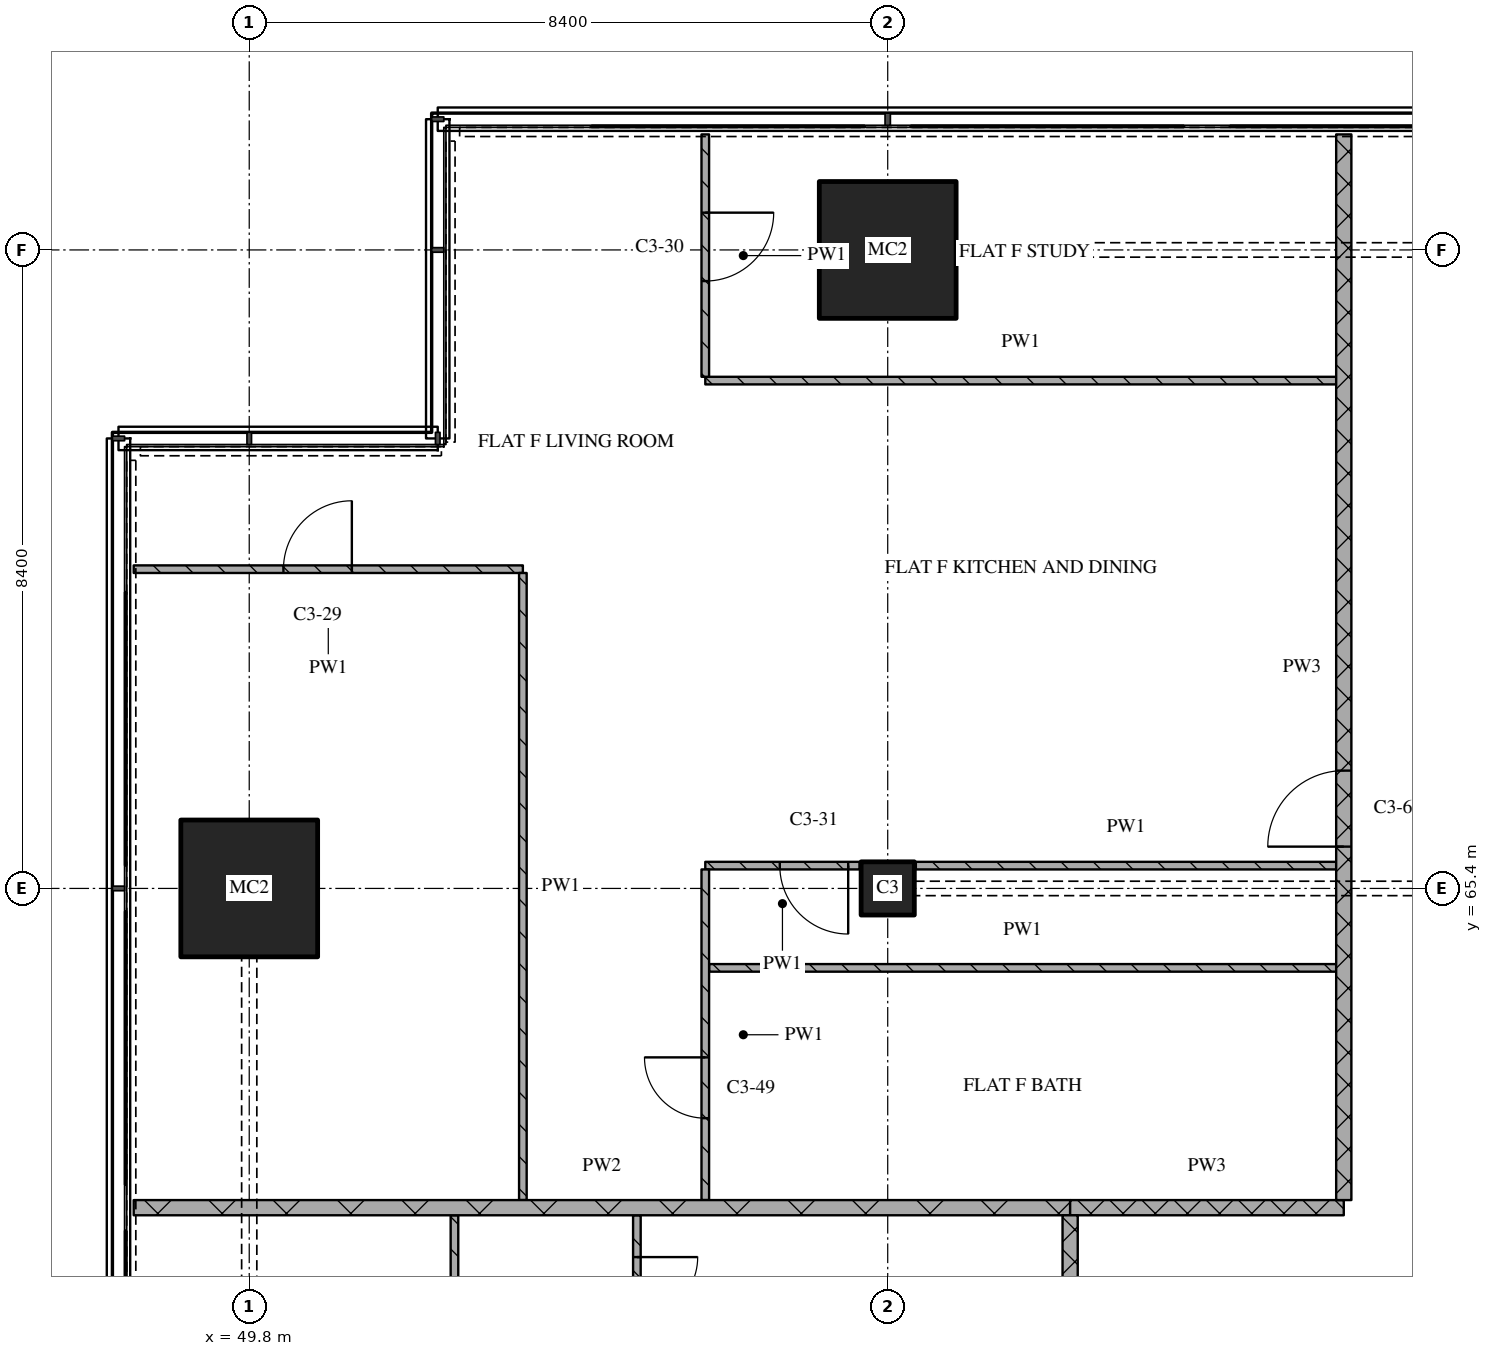
"""IFC4 building model, lengths in metres.
Left out: names, types, materials, properties, quantities, classifications, styles, units other than length and angle.
Written with IfcOpenShell. Run it as: python <this file> out.ifc"""

import sys

from ifc_helpers import new_model, si_unit, direction, frame, frame_2d, origin, origin_2d, place, context, subcontext, project, spatial, rectangle, extrude, element, fill, save


model = new_model("IFC4")
c1 = context("Model", 3, precision=1e-05, world=origin(), true_north=direction((0.0, 1.0)))
c2 = subcontext(c1, "Body", "Model", "MODEL_VIEW")
j1 = project(units=[si_unit("LENGTHUNIT", "METRE"), si_unit("PLANEANGLEUNIT", "RADIAN")], contexts=[c1])
p1 = place(None, origin())
s1 = spatial("IfcSite", under=j1, at=p1, CompositionType="ELEMENT")
p2 = place(p1, origin())
s2 = spatial("IfcBuilding", under=s1, at=p2, CompositionType="ELEMENT")
p3 = place(p2, frame((0.0, 0.0, 169.05)))
s3 = spatial("IfcBuildingStorey", under=s2, at=p3, CompositionType="ELEMENT", Elevation=169.05)
p4 = place(p3, frame((49.8, 65.4, 0.0), z_axis=(0.0, 0.0, 1.0), x_axis=(1.0, 0.0, 0.0)))
e1 = element("IfcColumn", 1, at=p4, inside=s3, PredefinedType="COLUMN", context=c2, shape_type="SweptSolid", body=[
    extrude(rectangle(XDim=1.8, YDim=1.8, at=origin_2d()), origin(), (0.0, 0.0, 1.0), 3.6),
])
p5 = place(p3, frame((58.2, 65.4, 0.0), z_axis=(0.0, 0.0, 1.0), x_axis=(1.0, 0.0, 0.0)))
e2 = element("IfcColumn", 2, at=p5, inside=s3, PredefinedType="COLUMN", context=c2, shape_type="SweptSolid", body=[
    extrude(rectangle(XDim=0.7, YDim=0.7, at=origin_2d()), origin(), (0.0, 0.0, 1.0), 3.6),
])
p6 = place(p3, frame((58.2, 73.8, 0.0), z_axis=(0.0, 0.0, 1.0), x_axis=(1.0, 0.0, 0.0)))
e3 = element("IfcColumn", 3, at=p6, inside=s3, PredefinedType="COLUMN", context=c2, shape_type="SweptSolid", body=[
    extrude(rectangle(XDim=1.8, YDim=1.8, at=origin_2d()), origin(), (0.0, 0.0, 1.0), 3.6),
])
p7 = place(p3, frame((60.6, 61.2, 0.0), z_axis=(0.0, 0.0, 1.0), x_axis=(1.0, 0.0, 0.0)))
e4 = element("IfcWall", 4, at=p7, inside=s3, PredefinedType="PARTITIONING", context=c2, shape_type="SweptSolid", body=[
    extrude(rectangle(XDim=3.6, YDim=0.2, at=frame_2d((1.8, 0.0))), origin(), (0.0, 0.0, 1.0), 3.32),
])
p8 = place(p3, frame((48.28, 61.2, 0.0), z_axis=(0.0, 0.0, 1.0), x_axis=(1.0, 0.0, 0.0)))
e5 = element("IfcWall", 5, at=p8, inside=s3, PredefinedType="PARTITIONING", context=c2, shape_type="SweptSolid", body=[
    extrude(rectangle(XDim=12.32, YDim=0.2, at=frame_2d((6.16, 0.0))), origin(), (0.0, 0.0, 1.0), 3.32),
])
p9 = place(p3, frame((55.85, 64.355, 0.0), z_axis=(0.0, 0.0, 1.0), x_axis=(1.0, 0.0, 0.0)))
e6 = element("IfcWall", 6, at=p9, inside=s3, PredefinedType="PARTITIONING", context=c2, shape_type="SweptSolid", body=[
    extrude(rectangle(XDim=8.25, YDim=0.1, at=frame_2d((4.125, 0.0))), origin(), (0.0, 0.0, 1.0), 3.32),
])
p10 = place(p3, frame((57.83, 65.7, 0.0), z_axis=(0.0, 0.0, 1.0), x_axis=(-1.0, 0.0, 0.0)))
e7 = element("IfcWall", 7, at=p10, inside=s3, PredefinedType="PARTITIONING", context=c2, shape_type="SweptSolid", body=[
    extrude(rectangle(XDim=2.03, YDim=0.1, at=frame_2d((1.015, 0.0))), origin(), (0.0, 0.0, 1.0), 3.32),
])
p11 = place(p10, frame((0.15, 0.0, 0.0)))
e8 = element("IfcOpeningElement", 8, at=p11, cuts=e7, PredefinedType="OPENING", context=c2, shape_type="SweptSolid", body=[
    extrude(rectangle(XDim=0.9, YDim=2.1, at=frame_2d((0.45, 1.05))), frame((0.0, 0.06, 0.0), z_axis=(0.0, -1.0, 0.0), x_axis=(1.0, 0.0, 0.0)), (0.0, 0.0, 1.0), 0.12),
])
p12 = place(p3, frame((58.57, 65.7, 0.0), z_axis=(0.0, 0.0, 1.0), x_axis=(1.0, 0.0, 0.0)))
e9 = element("IfcWall", 9, at=p12, inside=s3, PredefinedType="PARTITIONING", context=c2, shape_type="SweptSolid", body=[
    extrude(rectangle(XDim=5.53, YDim=0.1, at=frame_2d((2.765, 0.0))), origin(), (0.0, 0.0, 1.0), 3.32),
])
p13 = place(p3, frame((53.4, 69.6, 0.0), z_axis=(0.0, 0.0, 1.0), x_axis=(-1.0, 0.0, 0.0)))
e10 = element("IfcWall", 10, at=p13, inside=s3, PredefinedType="PARTITIONING", context=c2, shape_type="SweptSolid", body=[
    extrude(rectangle(XDim=5.12, YDim=0.1, at=frame_2d((2.56, 0.0))), origin(), (0.0, 0.0, 1.0), 3.32),
])
p14 = place(p13, frame((2.25, 0.0, 0.0)))
e11 = element("IfcOpeningElement", 11, at=p14, cuts=e10, PredefinedType="OPENING", context=c2, shape_type="SweptSolid", body=[
    extrude(rectangle(XDim=0.9, YDim=2.1, at=frame_2d((0.45, 1.05))), frame((0.0, 0.06, 0.0), z_axis=(0.0, -1.0, 0.0), x_axis=(1.0, 0.0, 0.0)), (0.0, 0.0, 1.0), 0.12),
])
p15 = place(p3, frame((55.8, 72.081, 0.0), z_axis=(0.0, 0.0, 1.0), x_axis=(1.0, 0.0, 0.0)))
e12 = element("IfcWall", 12, at=p15, inside=s3, PredefinedType="PARTITIONING", context=c2, shape_type="SweptSolid", body=[
    extrude(rectangle(XDim=8.3, YDim=0.1, at=frame_2d((4.15, 0.0))), origin(), (0.0, 0.0, 1.0), 3.32),
])
for number, where, z_axis, x_axis in (
    (13, (52.5, 61.1, 0.0), (0.0, 0.0, 1.0), (0.0, -1.0, 0.0)),
    (14, (53.4, 69.55, 0.0), (0.0, 0.0, 1.0), (0.0, -1.0, 0.0)),
):
    element("IfcWall", number, at=place(p3, frame(where, z_axis=z_axis, x_axis=x_axis)), inside=s3, PredefinedType="PARTITIONING", context=c2, shape_type="SweptSolid", body=[
        extrude(rectangle(XDim=8.25, YDim=0.1, at=frame_2d((4.125, 0.0))), origin(), (0.0, 0.0, 1.0), 3.32),
    ])
p16 = place(p3, frame((54.9, 61.1, 0.0), z_axis=(0.0, 0.0, 1.0), x_axis=(0.0, -1.0, 0.0)))
e15 = element("IfcWall", 15, at=p16, inside=s3, PredefinedType="PARTITIONING", context=c2, shape_type="SweptSolid", body=[
    extrude(rectangle(XDim=4.65, YDim=0.1, at=frame_2d((2.325, 0.0))), origin(), (0.0, 0.0, 1.0), 3.32),
])
p17 = place(p16, frame((0.55, 0.0, 0.0)))
e16 = element("IfcOpeningElement", 16, at=p17, cuts=e15, PredefinedType="OPENING", context=c2, shape_type="SweptSolid", body=[
    extrude(rectangle(XDim=0.8, YDim=2.1, at=frame_2d((0.4, 1.05))), frame((0.0, 0.06, 0.0), z_axis=(0.0, -1.0, 0.0), x_axis=(1.0, 0.0, 0.0)), (0.0, 0.0, 1.0), 0.12),
])
p18 = place(p3, frame((55.8, 65.65, 0.0), z_axis=(0.0, 0.0, 1.0), x_axis=(0.0, -1.0, 0.0)))
e17 = element("IfcWall", 17, at=p18, inside=s3, PredefinedType="PARTITIONING", context=c2, shape_type="SweptSolid", body=[
    extrude(rectangle(XDim=4.35, YDim=0.1, at=frame_2d((2.175, 0.0))), origin(), (0.0, 0.0, 1.0), 3.32),
])
p19 = place(p18, frame((2.473, 0.0, 0.0)))
e18 = element("IfcOpeningElement", 18, at=p19, cuts=e17, PredefinedType="OPENING", context=c2, shape_type="SweptSolid", body=[
    extrude(rectangle(XDim=0.8, YDim=2.1, at=frame_2d((0.4, 1.05))), frame((0.0, 0.06, 0.0), z_axis=(0.0, -1.0, 0.0), x_axis=(1.0, 0.0, 0.0)), (0.0, 0.0, 1.0), 0.12),
])
p20 = place(p3, frame((55.8, 75.32, 0.0), z_axis=(0.0, 0.0, 1.0), x_axis=(0.0, -1.0, 0.0)))
e19 = element("IfcWall", 19, at=p20, inside=s3, PredefinedType="PARTITIONING", context=c2, shape_type="SweptSolid", body=[
    extrude(rectangle(XDim=3.189, YDim=0.1, at=frame_2d((1.594, 0.0))), origin(), (0.0, 0.0, 1.0), 3.32),
])
p21 = place(p20, frame((1.03, 0.0, 0.0)))
e20 = element("IfcOpeningElement", 20, at=p21, cuts=e19, PredefinedType="OPENING", context=c2, shape_type="SweptSolid", body=[
    extrude(rectangle(XDim=0.9, YDim=2.1, at=frame_2d((0.45, 1.05))), frame((0.0, 0.06, 0.0), z_axis=(0.0, -1.0, 0.0), x_axis=(1.0, 0.0, 0.0)), (0.0, 0.0, 1.0), 0.12),
])
p22 = place(p3, frame((60.6, 43.3, 0.0), z_axis=(0.0, 0.0, 1.0), x_axis=(0.0, 1.0, 0.0)))
e21 = element("IfcWall", 21, at=p22, inside=s3, PredefinedType="PARTITIONING", context=c2, shape_type="SweptSolid", body=[
    extrude(rectangle(XDim=17.8, YDim=0.2, at=frame_2d((8.9, 0.0))), origin(), (0.0, 0.0, 1.0), 3.32),
])
p23 = place(p22, frame((11.85, 0.0, 0.0)))
e22 = element("IfcOpeningElement", 22, at=p23, cuts=e21, PredefinedType="OPENING", context=c2, shape_type="SweptSolid", body=[
    extrude(rectangle(XDim=1.0, YDim=2.1, at=frame_2d((0.5, 1.05))), frame((0.0, 0.11, 0.0), z_axis=(0.0, -1.0, 0.0), x_axis=(1.0, 0.0, 0.0)), (0.0, 0.0, 1.0), 0.22),
])
p24 = place(p3, frame((64.2, 61.3, 0.0), z_axis=(0.0, 0.0, 1.0), x_axis=(0.0, 1.0, 0.0)))
e23 = element("IfcWall", 23, at=p24, inside=s3, PredefinedType="PARTITIONING", context=c2, shape_type="SweptSolid", body=[
    extrude(rectangle(XDim=14.02, YDim=0.2, at=frame_2d((7.01, 0.0))), origin(), (0.0, 0.0, 1.0), 3.32),
])
p25 = place(p24, frame((4.65, 0.0, 0.0)))
e24 = element("IfcOpeningElement", 24, at=p25, cuts=e23, PredefinedType="OPENING", context=c2, shape_type="SweptSolid", body=[
    extrude(rectangle(XDim=1.0, YDim=2.1, at=frame_2d((0.5, 1.05))), frame((0.0, 0.11, 0.0), z_axis=(0.0, -1.0, 0.0), x_axis=(1.0, 0.0, 0.0)), (0.0, 0.0, 1.0), 0.22),
])
p26 = place(p11, origin())
e25 = element("IfcDoor", 25, at=p26, inside=s3, OperationType="SINGLE_SWING_LEFT", PredefinedType="DOOR", context=c2, shape_type="SweptSolid", body=[
    extrude(rectangle(XDim=0.9, YDim=2.1, at=frame_2d((0.45, 1.05))), frame((0.0, 0.025, 0.0), z_axis=(0.0, -1.0, 0.0), x_axis=(1.0, 0.0, 0.0)), (0.0, 0.0, 1.0), 0.05),
])
fill(e8, e25)
p27 = place(p14, origin())
e26 = element("IfcDoor", 26, at=p27, inside=s3, OperationType="SINGLE_SWING_RIGHT", PredefinedType="DOOR", context=c2, shape_type="SweptSolid", body=[
    extrude(rectangle(XDim=0.9, YDim=2.1, at=frame_2d((0.45, 1.05))), frame((0.0, 0.025, 0.0), z_axis=(0.0, -1.0, 0.0), x_axis=(1.0, 0.0, 0.0)), (0.0, 0.0, 1.0), 0.05),
])
fill(e11, e26)
p28 = place(p17, origin())
e27 = element("IfcDoor", 27, at=p28, inside=s3, OperationType="SINGLE_SWING_LEFT", PredefinedType="DOOR", context=c2, shape_type="SweptSolid", body=[
    extrude(rectangle(XDim=0.8, YDim=2.1, at=frame_2d((0.4, 1.05))), frame((0.0, 0.025, 0.0), z_axis=(0.0, -1.0, 0.0), x_axis=(1.0, 0.0, 0.0)), (0.0, 0.0, 1.0), 0.05),
])
fill(e16, e27)
p29 = place(p19, origin())
e28 = element("IfcDoor", 28, at=p29, inside=s3, OperationType="SINGLE_SWING_RIGHT", PredefinedType="DOOR", context=c2, shape_type="SweptSolid", body=[
    extrude(rectangle(XDim=0.8, YDim=2.1, at=frame_2d((0.4, 1.05))), frame((0.0, 0.025, 0.0), z_axis=(0.0, -1.0, 0.0), x_axis=(1.0, 0.0, 0.0)), (0.0, 0.0, 1.0), 0.05),
])
fill(e18, e28)
p30 = place(p21, origin())
e29 = element("IfcDoor", 29, at=p30, inside=s3, OperationType="SINGLE_SWING_LEFT", PredefinedType="DOOR", context=c2, shape_type="SweptSolid", body=[
    extrude(rectangle(XDim=0.9, YDim=2.1, at=frame_2d((0.45, 1.05))), frame((0.0, 0.025, 0.0), z_axis=(0.0, -1.0, 0.0), x_axis=(1.0, 0.0, 0.0)), (0.0, 0.0, 1.0), 0.05),
])
fill(e20, e29)
p31 = place(p25, origin())
e30 = element("IfcDoor", 30, at=p31, inside=s3, OperationType="SINGLE_SWING_LEFT", PredefinedType="DOOR", context=c2, shape_type="SweptSolid", body=[
    extrude(rectangle(XDim=1.0, YDim=2.1, at=frame_2d((0.5, 1.05))), frame((0.0, 0.025, 0.0), z_axis=(0.0, -1.0, 0.0), x_axis=(1.0, 0.0, 0.0)), (0.0, 0.0, 1.0), 0.05),
])
fill(e24, e30)
save(model, sys.argv[1])
